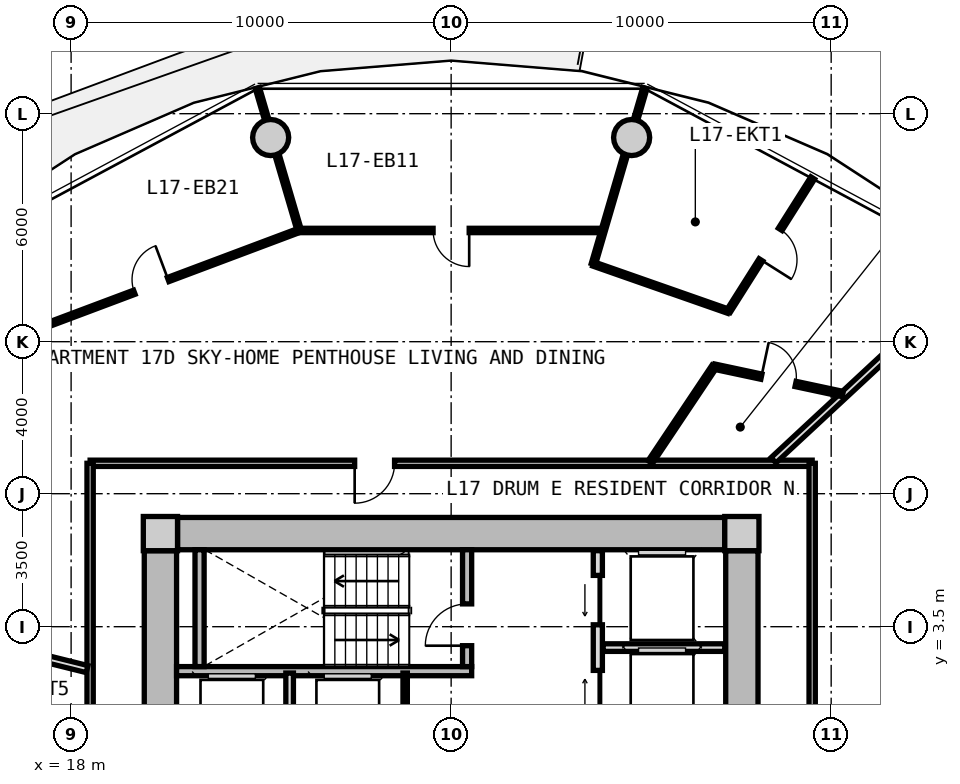
"""IFC4 building model, lengths in metres.
Left out: names, types, materials, properties, quantities, classifications, styles, units other than length and angle.
Written with IfcOpenShell. Run it as: python <this file> out.ifc"""

import sys

from ifc_helpers import new_model, si_unit, direction, frame, frame_2d, origin, origin_2d, place, context, subcontext, project, spatial, rectangle, circle, extrude, source, transform, mapped, element, fill, save


model = new_model("IFC4")
c1 = context("Model", 3, precision=1e-05, world=origin(), true_north=direction((0.0, 1.0)))
c2 = subcontext(c1, "Body", "Model", "MODEL_VIEW")
j1 = project(units=[si_unit("LENGTHUNIT", "METRE"), si_unit("PLANEANGLEUNIT", "RADIAN")], contexts=[c1])
p1 = place(None, origin())
s1 = spatial("IfcSite", under=j1, at=p1, CompositionType="ELEMENT")
p2 = place(p1, origin())
s2 = spatial("IfcBuilding", under=s1, at=p2, CompositionType="ELEMENT")
p3 = place(p2, frame((0.0, 0.0, 58.2)))
s3 = spatial("IfcBuildingStorey", under=s2, at=p3, CompositionType="ELEMENT", Elevation=58.2)
m1 = source(origin(), c2, "Body", "SweptSolid", [
    extrude(rectangle(XDim=0.9, YDim=0.9, at=origin_2d()), origin(), (0.0, 0.0, 1.0), 3.05),
])
for number, where, z_axis, x_axis in (
    (1, (35.65, 5.95, 0.0), (0.0, 0.0, 1.0), (1.0, 0.0, 0.0)),
    (2, (20.35, 5.95, 0.0), (0.0, 0.0, 1.0), (1.0, 0.0, 0.0)),
):
    element("IfcColumn", number, at=place(p3, frame(where, z_axis=z_axis, x_axis=x_axis)), inside=s3, PredefinedType="COLUMN", context=c2, shape_type="MappedRepresentation", body=[
        mapped(m1, transform((0.0, 0.0, 0.0), x_axis=(1.0, 0.0, 0.0), y_axis=(0.0, 1.0, 0.0), z_axis=(0.0, 0.0, 1.0), scale=1.0)),
    ])
m2 = source(origin(), c2, "Body", "SweptSolid", [
    extrude(rectangle(XDim=14.4, YDim=0.85, at=frame_2d((7.2, 0.0))), origin(), (0.0, 0.0, 1.0), 2.79),
])
p4 = place(p3, frame((20.8, 5.95, 0.0), z_axis=(0.0, 0.0, 1.0), x_axis=(1.0, 0.0, 0.0)))
e3 = element("IfcWall", 3, at=p4, inside=s3, PredefinedType="SHEAR", context=c2, shape_type="MappedRepresentation", body=[
    mapped(m2, transform((0.0, 0.0, 0.0), x_axis=(1.0, 0.0, 0.0), y_axis=(0.0, 1.0, 0.0), z_axis=(0.0, 0.0, 1.0), scale=1.0)),
])
m3 = source(origin(), c2, "Body", "SweptSolid", [
    extrude(rectangle(XDim=11.0, YDim=0.85, at=frame_2d((5.5, 0.0))), origin(), (0.0, 0.0, 1.0), 2.79),
])
p5 = place(p3, frame((20.35, -5.5, 0.0), z_axis=(0.0, 0.0, 1.0), x_axis=(0.0, 1.0, 0.0)))
e4 = element("IfcWall", 4, at=p5, inside=s3, PredefinedType="SHEAR", context=c2, shape_type="MappedRepresentation", body=[
    mapped(m3, transform((0.0, 0.0, 0.0), x_axis=(1.0, 0.0, 0.0), y_axis=(0.0, 1.0, 0.0), z_axis=(0.0, 0.0, 1.0), scale=1.0)),
])
p6 = place(p5, frame((3.8, 0.0, 0.0)))
e5 = element("IfcOpeningElement", 5, at=p6, cuts=e4, PredefinedType="OPENING", context=c2, shape_type="SweptSolid", body=[
    extrude(rectangle(XDim=1.2, YDim=2.15, at=frame_2d((0.6, 1.075))), frame((0.0, 0.435, 0.0), z_axis=(0.0, -1.0, 0.0), x_axis=(1.0, 0.0, 0.0)), (0.0, 0.0, 1.0), 0.87),
])
p7 = place(p3, frame((35.65, 5.5, 0.0), z_axis=(0.0, 0.0, 1.0), x_axis=(0.0, -1.0, 0.0)))
e6 = element("IfcWall", 6, at=p7, inside=s3, PredefinedType="SHEAR", context=c2, shape_type="MappedRepresentation", body=[
    mapped(m3, transform((0.0, 0.0, 0.0), x_axis=(1.0, 0.0, 0.0), y_axis=(0.0, 1.0, 0.0), z_axis=(0.0, 0.0, 1.0), scale=1.0)),
])
p8 = place(p7, frame((5.65, 0.0, 0.0)))
e7 = element("IfcOpeningElement", 7, at=p8, cuts=e6, PredefinedType="OPENING", context=c2, shape_type="SweptSolid", body=[
    extrude(rectangle(XDim=1.2, YDim=2.15, at=frame_2d((0.6, 1.075))), frame((0.0, 0.435, 0.0), z_axis=(0.0, -1.0, 0.0), x_axis=(1.0, 0.0, 0.0)), (0.0, 0.0, 1.0), 0.87),
])
p9 = place(p7, frame((9.3, 0.0, 0.0)))
e8 = element("IfcOpeningElement", 8, at=p9, cuts=e6, PredefinedType="OPENING", context=c2, shape_type="SweptSolid", body=[
    extrude(rectangle(XDim=1.0, YDim=2.1, at=frame_2d((0.5, 1.05))), frame((0.0, 0.435, 0.0), z_axis=(0.0, -1.0, 0.0), x_axis=(1.0, 0.0, 0.0)), (0.0, 0.0, 1.0), 0.87),
])
m4 = source(origin(), c2, "Body", "SweptSolid", [
    extrude(circle(Radius=0.475, at=origin_2d()), origin(), (0.0, 0.0, 1.0), 3.05),
])
for number, where, z_axis, x_axis in (
    (9, (32.749, 16.373, 0.0), (0.0, 0.0, 1.0), (1.0, 0.0, 0.0)),
    (10, (23.251, 16.373, 0.0), (0.0, 0.0, 1.0), (1.0, 0.0, 0.0)),
):
    element("IfcColumn", number, at=place(p3, frame(where, z_axis=z_axis, x_axis=x_axis)), inside=s3, PredefinedType="COLUMN", context=c2, shape_type="MappedRepresentation", body=[
        mapped(m4, transform((0.0, 0.0, 0.0), x_axis=(1.0, 0.0, 0.0), y_axis=(0.0, 1.0, 0.0), z_axis=(0.0, 0.0, 1.0), scale=1.0)),
    ])
m5 = source(origin(), c2, "Body", "SweptSolid", [
    extrude(rectangle(XDim=7.765, YDim=0.24, at=frame_2d((3.883, 0.0))), origin(), (0.0, 0.0, 1.0), 2.79),
])
p10 = place(p3, frame((20.775, 2.33, 0.0), z_axis=(0.0, 0.0, 1.0), x_axis=(1.0, 0.0, 0.0)))
e11 = element("IfcWall", 11, at=p10, inside=s3, PredefinedType="PARTITIONING", context=c2, shape_type="MappedRepresentation", body=[
    mapped(m5, transform((0.0, 0.0, 0.0), x_axis=(1.0, 0.0, 0.0), y_axis=(0.0, 1.0, 0.0), z_axis=(0.0, 0.0, 1.0), scale=1.0)),
])
m6 = source(origin(), c2, "Body", "SweptSolid", [
    extrude(rectangle(XDim=3.075, YDim=0.24, at=frame_2d((1.538, 0.0))), origin(), (0.0, 0.0, 1.0), 2.79),
])
p11 = place(p3, frame((21.38, 2.45, 0.0), z_axis=(0.0, 0.0, 1.0), x_axis=(0.0, 1.0, 0.0)))
e12 = element("IfcWall", 12, at=p11, inside=s3, PredefinedType="PARTITIONING", context=c2, shape_type="MappedRepresentation", body=[
    mapped(m6, transform((0.0, 0.0, 0.0), x_axis=(1.0, 0.0, 0.0), y_axis=(0.0, 1.0, 0.0), z_axis=(0.0, 0.0, 1.0), scale=1.0)),
])
p12 = place(p3, frame((28.42, 2.45, 0.0), z_axis=(0.0, 0.0, 1.0), x_axis=(0.0, 1.0, 0.0)))
e13 = element("IfcWall", 13, at=p12, inside=s3, PredefinedType="PARTITIONING", context=c2, shape_type="MappedRepresentation", body=[
    mapped(m6, transform((0.0, 0.0, 0.0), x_axis=(1.0, 0.0, 0.0), y_axis=(0.0, 1.0, 0.0), z_axis=(0.0, 0.0, 1.0), scale=1.0)),
])
p13 = place(p12, frame((0.55, 0.0, 0.0)))
e14 = element("IfcOpeningElement", 14, at=p13, cuts=e13, PredefinedType="OPENING", context=c2, shape_type="SweptSolid", body=[
    extrude(rectangle(XDim=1.1, YDim=2.15, at=frame_2d((0.55, 1.075))), frame((0.0, 0.13, 0.0), z_axis=(0.0, -1.0, 0.0), x_axis=(1.0, 0.0, 0.0)), (0.0, 0.0, 1.0), 0.26),
])
m7 = source(origin(), c2, "Body", "SweptSolid", [
    extrude(rectangle(XDim=5.0, YDim=0.24, at=frame_2d((2.5, 0.0))), origin(), (0.0, 0.0, 1.0), 2.775),
])
p14 = place(p3, frame((31.86, 0.5, 0.0), z_axis=(0.0, 0.0, 1.0), x_axis=(0.0, 1.0, 0.0)))
e15 = element("IfcWall", 15, at=p14, inside=s3, PredefinedType="PARTITIONING", context=c2, shape_type="MappedRepresentation", body=[
    mapped(m7, transform((0.0, 0.0, 0.0), x_axis=(1.0, 0.0, 0.0), y_axis=(0.0, 1.0, 0.0), z_axis=(0.0, 0.0, 1.0), scale=1.0)),
])
p15 = place(p14, frame((3.05, 0.0, 0.0)))
e16 = element("IfcOpeningElement", 16, at=p15, cuts=e15, PredefinedType="OPENING", context=c2, shape_type="SweptSolid", body=[
    extrude(rectangle(XDim=1.3, YDim=2.2, at=frame_2d((0.65, 1.1))), frame((0.0, 0.13, 0.0), z_axis=(0.0, -1.0, 0.0), x_axis=(1.0, 0.0, 0.0)), (0.0, 0.0, 1.0), 0.26),
])
p16 = place(p14, frame((0.55, 0.0, 0.0)))
e17 = element("IfcOpeningElement", 17, at=p16, cuts=e15, PredefinedType="OPENING", context=c2, shape_type="SweptSolid", body=[
    extrude(rectangle(XDim=1.3, YDim=2.2, at=frame_2d((0.65, 1.1))), frame((0.0, 0.13, 0.0), z_axis=(0.0, -1.0, 0.0), x_axis=(1.0, 0.0, 0.0)), (0.0, 0.0, 1.0), 0.26),
])
m8 = source(origin(), c2, "Body", "SweptSolid", [
    extrude(rectangle(XDim=3.2, YDim=0.2, at=frame_2d((1.6, 0.0))), origin(), (0.0, 0.0, 1.0), 2.775),
])
p17 = place(p3, frame((32.0, 2.95, 0.0), z_axis=(0.0, 0.0, 1.0), x_axis=(1.0, 0.0, 0.0)))
e18 = element("IfcWall", 18, at=p17, inside=s3, PredefinedType="PARTITIONING", context=c2, shape_type="MappedRepresentation", body=[
    mapped(m8, transform((0.0, 0.0, 0.0), x_axis=(1.0, 0.0, 0.0), y_axis=(0.0, 1.0, 0.0), z_axis=(0.0, 0.0, 1.0), scale=1.0)),
])
m9 = source(origin(), c2, "Body", "SweptSolid", [
    extrude(rectangle(XDim=2.33, YDim=0.115, at=frame_2d((1.165, 0.0))), origin(), (0.0, 0.0, 1.0), 2.775),
])
p18 = place(p3, frame((26.79, -0.05, 0.0), z_axis=(0.0, 0.0, 1.0), x_axis=(0.0, 1.0, 0.0)))
e19 = element("IfcWall", 19, at=p18, inside=s3, PredefinedType="PARTITIONING", context=c2, shape_type="MappedRepresentation", body=[
    mapped(m9, transform((0.0, 0.0, 0.0), x_axis=(1.0, 0.0, 0.0), y_axis=(0.0, 1.0, 0.0), z_axis=(0.0, 0.0, 1.0), scale=1.0)),
])
m10 = source(origin(), c2, "Body", "SweptSolid", [
    extrude(rectangle(XDim=2.33, YDim=0.2, at=frame_2d((1.165, 0.0))), origin(), (0.0, 0.0, 1.0), 2.775),
])
p19 = place(p3, frame((23.75, -0.05, 0.0), z_axis=(0.0, 0.0, 1.0), x_axis=(0.0, 1.0, 0.0)))
e20 = element("IfcWall", 20, at=p19, inside=s3, PredefinedType="PARTITIONING", context=c2, shape_type="MappedRepresentation", body=[
    mapped(m10, transform((0.0, 0.0, 0.0), x_axis=(1.0, 0.0, 0.0), y_axis=(0.0, 1.0, 0.0), z_axis=(0.0, 0.0, 1.0), scale=1.0)),
])
m11 = source(origin(), c2, "Body", "SweptSolid", [
    extrude(rectangle(XDim=19.0, YDim=0.165, at=frame_2d((9.5, 0.0))), origin(), (0.0, 0.0, 1.0), 2.775),
])
p20 = place(p3, frame((18.5, 7.8, 0.0), z_axis=(0.0, 0.0, 1.0), x_axis=(1.0, 0.0, 0.0)))
e21 = element("IfcWall", 21, at=p20, inside=s3, PredefinedType="PARTITIONING", context=c2, shape_type="MappedRepresentation", body=[
    mapped(m11, transform((0.0, 0.0, 0.0), x_axis=(1.0, 0.0, 0.0), y_axis=(0.0, 1.0, 0.0), z_axis=(0.0, 0.0, 1.0), scale=1.0)),
])
p21 = place(p20, frame((6.961, 0.0, 0.0)))
e22 = element("IfcOpeningElement", 22, at=p21, cuts=e21, PredefinedType="OPENING", context=c2, shape_type="SweptSolid", body=[
    extrude(rectangle(XDim=1.05, YDim=2.15, at=frame_2d((0.525, 1.075))), frame((0.0, 0.093, 0.0), z_axis=(0.0, -1.0, 0.0), x_axis=(1.0, 0.0, 0.0)), (0.0, 0.0, 1.0), 0.185),
])
m12 = source(origin(), c2, "Body", "SweptSolid", [
    extrude(rectangle(XDim=15.6, YDim=0.165, at=frame_2d((7.8, 0.0))), origin(), (0.0, 0.0, 1.0), 2.775),
])
p22 = place(p3, frame((18.5, -7.8, 0.0), z_axis=(0.0, 0.0, 1.0), x_axis=(0.0, 1.0, 0.0)))
e23 = element("IfcWall", 23, at=p22, inside=s3, PredefinedType="PARTITIONING", context=c2, shape_type="MappedRepresentation", body=[
    mapped(m12, transform((0.0, 0.0, 0.0), x_axis=(1.0, 0.0, 0.0), y_axis=(0.0, 1.0, 0.0), z_axis=(0.0, 0.0, 1.0), scale=1.0)),
])
p23 = place(p22, frame((3.63, 0.0, 0.0)))
e24 = element("IfcOpeningElement", 24, at=p23, cuts=e23, PredefinedType="OPENING", context=c2, shape_type="SweptSolid", body=[
    extrude(rectangle(XDim=1.05, YDim=2.15, at=frame_2d((0.525, 1.075))), frame((0.0, 0.093, 0.0), z_axis=(0.0, -1.0, 0.0), x_axis=(1.0, 0.0, 0.0)), (0.0, 0.0, 1.0), 0.185),
])
p24 = place(p3, frame((37.5, 7.8, 0.0), z_axis=(0.0, 0.0, 1.0), x_axis=(0.0, -1.0, 0.0)))
e25 = element("IfcWall", 25, at=p24, inside=s3, PredefinedType="PARTITIONING", context=c2, shape_type="MappedRepresentation", body=[
    mapped(m12, transform((0.0, 0.0, 0.0), x_axis=(1.0, 0.0, 0.0), y_axis=(0.0, 1.0, 0.0), z_axis=(0.0, 0.0, 1.0), scale=1.0)),
])
p25 = place(p24, frame((7.275, 0.0, 0.0)))
e26 = element("IfcOpeningElement", 26, at=p25, cuts=e25, PredefinedType="OPENING", context=c2, shape_type="SweptSolid", body=[
    extrude(rectangle(XDim=1.05, YDim=2.15, at=frame_2d((0.525, 1.075))), frame((0.0, 0.093, 0.0), z_axis=(0.0, -1.0, 0.0), x_axis=(1.0, 0.0, 0.0)), (0.0, 0.0, 1.0), 0.185),
])
m13 = source(origin(), c2, "Body", "SweptSolid", [
    extrude(rectangle(XDim=9.737, YDim=0.19, at=frame_2d((4.869, 0.0))), origin(), (0.0, 0.0, 1.0), 2.225),
])
p26 = place(p3, frame((18.42, 2.385, 0.0), z_axis=(0.0, 0.0, 1.0), x_axis=(-0.970392716238, 0.241532557375, 0.0)))
e27 = element("IfcWall", 27, at=p26, inside=s3, PredefinedType="PARTITIONING", context=c2, shape_type="MappedRepresentation", body=[
    mapped(m13, transform((0.0, 0.0, 0.0), x_axis=(1.0, 0.0, 0.0), y_axis=(0.0, 1.0, 0.0), z_axis=(0.0, 0.0, 1.0), scale=1.0)),
])
m14 = source(origin(), c2, "Body", "SweptSolid", [
    extrude(rectangle(XDim=7.435, YDim=0.19, at=frame_2d((3.717, 0.0))), origin(), (0.0, 0.0, 1.0), 2.225),
])
p27 = place(p3, frame((36.483, 7.88, 0.0), z_axis=(0.0, 0.0, 1.0), x_axis=(0.732651956848, 0.680603489652, 0.0)))
e28 = element("IfcWall", 28, at=p27, inside=s3, PredefinedType="PARTITIONING", context=c2, shape_type="MappedRepresentation", body=[
    mapped(m14, transform((0.0, 0.0, 0.0), x_axis=(1.0, 0.0, 0.0), y_axis=(0.0, 1.0, 0.0), z_axis=(0.0, 0.0, 1.0), scale=1.0)),
])
m15 = source(origin(), c2, "Body", "SweptSolid", [
    extrude(rectangle(XDim=7.993, YDim=0.115, at=frame_2d((3.996, 0.0))), origin(), (0.0, 0.0, 1.0), 2.775),
])
p28 = place(p3, frame((31.996, 13.927, 0.0), z_axis=(0.0, 0.0, 1.0), x_axis=(-1.0, 0.0, 0.0)))
e29 = element("IfcWall", 29, at=p28, inside=s3, PredefinedType="PARTITIONING", context=c2, shape_type="MappedRepresentation", body=[
    mapped(m15, transform((0.0, 0.0, 0.0), x_axis=(1.0, 0.0, 0.0), y_axis=(0.0, 1.0, 0.0), z_axis=(0.0, 0.0, 1.0), scale=1.0)),
])
p29 = place(p28, frame((3.521, 0.0, 0.0)))
e30 = element("IfcOpeningElement", 30, at=p29, cuts=e29, PredefinedType="OPENING", context=c2, shape_type="SweptSolid", body=[
    extrude(rectangle(XDim=0.95, YDim=2.1, at=frame_2d((0.475, 1.05))), frame((0.0, 0.067, 0.0), z_axis=(0.0, -1.0, 0.0), x_axis=(1.0, 0.0, 0.0)), (0.0, 0.0, 1.0), 0.135),
])
m16 = source(origin(), c2, "Body", "SweptSolid", [
    extrude(rectangle(XDim=4.829, YDim=0.115, at=frame_2d((2.415, 0.0))), origin(), (0.0, 0.0, 1.0), 2.225),
])
p30 = place(p3, frame((31.742, 13.042, 0.0), z_axis=(0.0, 0.0, 1.0), x_axis=(0.280838556456, 0.959755023539, 0.0)))
e31 = element("IfcWall", 31, at=p30, inside=s3, PredefinedType="PARTITIONING", context=c2, shape_type="MappedRepresentation", body=[
    mapped(m16, transform((0.0, 0.0, 0.0), x_axis=(1.0, 0.0, 0.0), y_axis=(0.0, 1.0, 0.0), z_axis=(0.0, 0.0, 1.0), scale=1.0)),
])
m17 = source(origin(), c2, "Body", "SweptSolid", [
    extrude(rectangle(XDim=8.32, YDim=0.115, at=frame_2d((4.16, 0.0))), origin(), (0.0, 0.0, 1.0), 2.775),
])
p31 = place(p3, frame((24.003, 13.93, 0.0), z_axis=(0.0, 0.0, 1.0), x_axis=(-0.936180763098, -0.351518959382, 0.0)))
e32 = element("IfcWall", 32, at=p31, inside=s3, PredefinedType="PARTITIONING", context=c2, shape_type="MappedRepresentation", body=[
    mapped(m17, transform((0.0, 0.0, 0.0), x_axis=(1.0, 0.0, 0.0), y_axis=(0.0, 1.0, 0.0), z_axis=(0.0, 0.0, 1.0), scale=1.0)),
])
p32 = place(p31, frame((3.685, 0.0, 0.0)))
e33 = element("IfcOpeningElement", 33, at=p32, cuts=e32, PredefinedType="OPENING", context=c2, shape_type="SweptSolid", body=[
    extrude(rectangle(XDim=0.95, YDim=2.1, at=frame_2d((0.475, 1.05))), frame((0.0, 0.067, 0.0), z_axis=(0.0, -1.0, 0.0), x_axis=(1.0, 0.0, 0.0)), (0.0, 0.0, 1.0), 0.135),
])
m18 = source(origin(), c2, "Body", "SweptSolid", [
    extrude(rectangle(XDim=3.905, YDim=0.115, at=frame_2d((1.952, 0.0))), origin(), (0.0, 0.0, 1.0), 2.225),
])
p33 = place(p3, frame((24.003, 13.93, 0.0), z_axis=(0.0, 0.0, 1.0), x_axis=(-0.282037692958, 0.959403324859, 0.0)))
e34 = element("IfcWall", 34, at=p33, inside=s3, PredefinedType="PARTITIONING", context=c2, shape_type="MappedRepresentation", body=[
    mapped(m18, transform((0.0, 0.0, 0.0), x_axis=(1.0, 0.0, 0.0), y_axis=(0.0, 1.0, 0.0), z_axis=(0.0, 0.0, 1.0), scale=1.0)),
])
m19 = source(origin(), c2, "Body", "SweptSolid", [
    extrude(rectangle(XDim=3.025, YDim=0.14, at=frame_2d((1.513, 0.0))), origin(), (0.0, 0.0, 1.0), 2.775),
])
p34 = place(p3, frame((33.24, 7.83, 0.0), z_axis=(0.0, 0.0, 1.0), x_axis=(0.556189165904, 0.831055721195, 0.0)))
e35 = element("IfcWall", 35, at=p34, inside=s3, PredefinedType="PARTITIONING", context=c2, shape_type="MappedRepresentation", body=[
    mapped(m19, transform((0.0, 0.0, 0.0), x_axis=(1.0, 0.0, 0.0), y_axis=(0.0, 1.0, 0.0), z_axis=(0.0, 0.0, 1.0), scale=1.0)),
])
m20 = source(origin(), c2, "Body", "SweptSolid", [
    extrude(rectangle(XDim=3.459, YDim=0.14, at=frame_2d((1.729, 0.0))), origin(), (0.0, 0.0, 1.0), 2.775),
])
p35 = place(p3, frame((34.922, 10.344, 0.0), z_axis=(0.0, 0.0, 1.0), x_axis=(0.978006468578, -0.208574560815, 0.0)))
e36 = element("IfcWall", 36, at=p35, inside=s3, PredefinedType="PARTITIONING", context=c2, shape_type="MappedRepresentation", body=[
    mapped(m20, transform((0.0, 0.0, 0.0), x_axis=(1.0, 0.0, 0.0), y_axis=(0.0, 1.0, 0.0), z_axis=(0.0, 0.0, 1.0), scale=1.0)),
])
p36 = place(p35, frame((1.27, 0.0, 0.0)))
e37 = element("IfcOpeningElement", 37, at=p36, cuts=e36, PredefinedType="OPENING", context=c2, shape_type="SweptSolid", body=[
    extrude(rectangle(XDim=0.92, YDim=2.1, at=frame_2d((0.46, 1.05))), frame((0.0, 0.08, 0.0), z_axis=(0.0, -1.0, 0.0), x_axis=(1.0, 0.0, 0.0)), (0.0, 0.0, 1.0), 0.16),
])
m21 = source(origin(), c2, "Body", "SweptSolid", [
    extrude(rectangle(XDim=4.15, YDim=0.115, at=frame_2d((2.075, 0.0))), origin(), (0.0, 0.0, 1.0), 2.775),
])
p37 = place(p3, frame((35.296, 11.801, 0.0), z_axis=(0.0, 0.0, 1.0), x_axis=(0.534475378192, 0.845184045109, 0.0)))
e38 = element("IfcWall", 38, at=p37, inside=s3, PredefinedType="PARTITIONING", context=c2, shape_type="MappedRepresentation", body=[
    mapped(m21, transform((0.0, 0.0, 0.0), x_axis=(1.0, 0.0, 0.0), y_axis=(0.0, 1.0, 0.0), z_axis=(0.0, 0.0, 1.0), scale=1.0)),
])
p38 = place(p37, frame((1.6, 0.0, 0.0)))
e39 = element("IfcOpeningElement", 39, at=p38, cuts=e38, PredefinedType="OPENING", context=c2, shape_type="SweptSolid", body=[
    extrude(rectangle(XDim=0.95, YDim=2.1, at=frame_2d((0.475, 1.05))), frame((0.0, 0.067, 0.0), z_axis=(0.0, -1.0, 0.0), x_axis=(1.0, 0.0, 0.0)), (0.0, 0.0, 1.0), 0.135),
])
m22 = source(origin(), c2, "Body", "SweptSolid", [
    extrude(rectangle(XDim=3.765, YDim=0.115, at=frame_2d((1.882, 0.0))), origin(), (0.0, 0.0, 1.0), 2.775),
])
p39 = place(p3, frame((35.296, 11.801, 0.0), z_axis=(0.0, 0.0, 1.0), x_axis=(-0.943788572669, 0.330549739222, 0.0)))
e40 = element("IfcWall", 40, at=p39, inside=s3, PredefinedType="PARTITIONING", context=c2, shape_type="MappedRepresentation", body=[
    mapped(m22, transform((0.0, 0.0, 0.0), x_axis=(1.0, 0.0, 0.0), y_axis=(0.0, 1.0, 0.0), z_axis=(0.0, 0.0, 1.0), scale=1.0)),
])
m23 = source(origin(), c2, "Body", "SweptSolid", [
    extrude(rectangle(XDim=1.1, YDim=2.15, at=frame_2d((0.55, 1.075))), frame((0.0, 0.025, 0.0), z_axis=(0.0, -1.0, 0.0), x_axis=(1.0, 0.0, 0.0)), (0.0, 0.0, 1.0), 0.05),
])
p40 = place(p13, origin())
e41 = element("IfcDoor", 41, at=p40, inside=s3, OperationType="SINGLE_SWING_LEFT", PredefinedType="DOOR", context=c2, shape_type="MappedRepresentation", body=[
    mapped(m23, transform((0.0, 0.0, 0.0), x_axis=(1.0, 0.0, 0.0), y_axis=(0.0, 1.0, 0.0), z_axis=(0.0, 0.0, 1.0), scale=1.0)),
])
fill(e14, e41)
m24 = source(origin(), c2, "Body", "SweptSolid", [
    extrude(rectangle(XDim=1.3, YDim=2.2, at=frame_2d((0.65, 1.1))), frame((0.0, 0.025, 0.0), z_axis=(0.0, -1.0, 0.0), x_axis=(1.0, 0.0, 0.0)), (0.0, 0.0, 1.0), 0.05),
])
p41 = place(p15, origin())
e42 = element("IfcDoor", 42, at=p41, inside=s3, OperationType="SLIDING_TO_LEFT", PredefinedType="DOOR", context=c2, shape_type="MappedRepresentation", body=[
    mapped(m24, transform((0.0, 0.0, 0.0), x_axis=(1.0, 0.0, 0.0), y_axis=(0.0, 1.0, 0.0), z_axis=(0.0, 0.0, 1.0), scale=1.0)),
])
fill(e16, e42)
p42 = place(p16, origin())
e43 = element("IfcDoor", 43, at=p42, inside=s3, OperationType="SLIDING_TO_RIGHT", PredefinedType="DOOR", context=c2, shape_type="MappedRepresentation", body=[
    mapped(m24, transform((0.0, 0.0, 0.0), x_axis=(1.0, 0.0, 0.0), y_axis=(0.0, 1.0, 0.0), z_axis=(0.0, 0.0, 1.0), scale=1.0)),
])
fill(e17, e43)
m25 = source(origin(), c2, "Body", "SweptSolid", [
    extrude(rectangle(XDim=1.05, YDim=2.15, at=frame_2d((0.525, 1.075))), frame((0.0, 0.025, 0.0), z_axis=(0.0, -1.0, 0.0), x_axis=(1.0, 0.0, 0.0)), (0.0, 0.0, 1.0), 0.05),
])
p43 = place(p21, frame((1.05, 0.0, 0.0), z_axis=(0.0, 0.0, 1.0), x_axis=(-1.0, 0.0, 0.0)))
e44 = element("IfcDoor", 44, at=p43, inside=s3, OperationType="SINGLE_SWING_RIGHT", PredefinedType="DOOR", context=c2, shape_type="MappedRepresentation", body=[
    mapped(m25, transform((0.0, 0.0, 0.0), x_axis=(1.0, 0.0, 0.0), y_axis=(0.0, 1.0, 0.0), z_axis=(0.0, 0.0, 1.0), scale=1.0)),
])
fill(e22, e44)
m26 = source(origin(), c2, "Body", "SweptSolid", [
    extrude(rectangle(XDim=0.92, YDim=2.1, at=frame_2d((0.46, 1.05))), frame((0.0, 0.025, 0.0), z_axis=(0.0, -1.0, 0.0), x_axis=(1.0, 0.0, 0.0)), (0.0, 0.0, 1.0), 0.05),
])
p44 = place(p36, origin())
e45 = element("IfcDoor", 45, at=p44, inside=s3, OperationType="SINGLE_SWING_LEFT", PredefinedType="DOOR", context=c2, shape_type="MappedRepresentation", body=[
    mapped(m26, transform((0.0, 0.0, 0.0), x_axis=(1.0, 0.0, 0.0), y_axis=(0.0, 1.0, 0.0), z_axis=(0.0, 0.0, 1.0), scale=1.0)),
])
fill(e37, e45)
m27 = source(origin(), c2, "Body", "SweptSolid", [
    extrude(rectangle(XDim=0.95, YDim=2.1, at=frame_2d((0.475, 1.05))), frame((0.0, 0.025, 0.0), z_axis=(0.0, -1.0, 0.0), x_axis=(1.0, 0.0, 0.0)), (0.0, 0.0, 1.0), 0.05),
])
p45 = place(p38, frame((0.95, 0.0, 0.0), z_axis=(0.0, 0.0, 1.0), x_axis=(-1.0, 0.0, 0.0)))
e46 = element("IfcDoor", 46, at=p45, inside=s3, OperationType="SINGLE_SWING_RIGHT", PredefinedType="DOOR", context=c2, shape_type="MappedRepresentation", body=[
    mapped(m27, transform((0.0, 0.0, 0.0), x_axis=(1.0, 0.0, 0.0), y_axis=(0.0, 1.0, 0.0), z_axis=(0.0, 0.0, 1.0), scale=1.0)),
])
fill(e39, e46)
p46 = place(p29, origin())
e47 = element("IfcDoor", 47, at=p46, inside=s3, OperationType="SINGLE_SWING_LEFT", PredefinedType="DOOR", context=c2, shape_type="MappedRepresentation", body=[
    mapped(m27, transform((0.0, 0.0, 0.0), x_axis=(1.0, 0.0, 0.0), y_axis=(0.0, 1.0, 0.0), z_axis=(0.0, 0.0, 1.0), scale=1.0)),
])
fill(e30, e47)
p47 = place(p32, frame((0.95, 0.0, 0.0), z_axis=(0.0, 0.0, 1.0), x_axis=(-1.0, 0.0, 0.0)))
e48 = element("IfcDoor", 48, at=p47, inside=s3, OperationType="SINGLE_SWING_RIGHT", PredefinedType="DOOR", context=c2, shape_type="MappedRepresentation", body=[
    mapped(m27, transform((0.0, 0.0, 0.0), x_axis=(1.0, 0.0, 0.0), y_axis=(0.0, 1.0, 0.0), z_axis=(0.0, 0.0, 1.0), scale=1.0)),
])
fill(e33, e48)
save(model, sys.argv[1])
